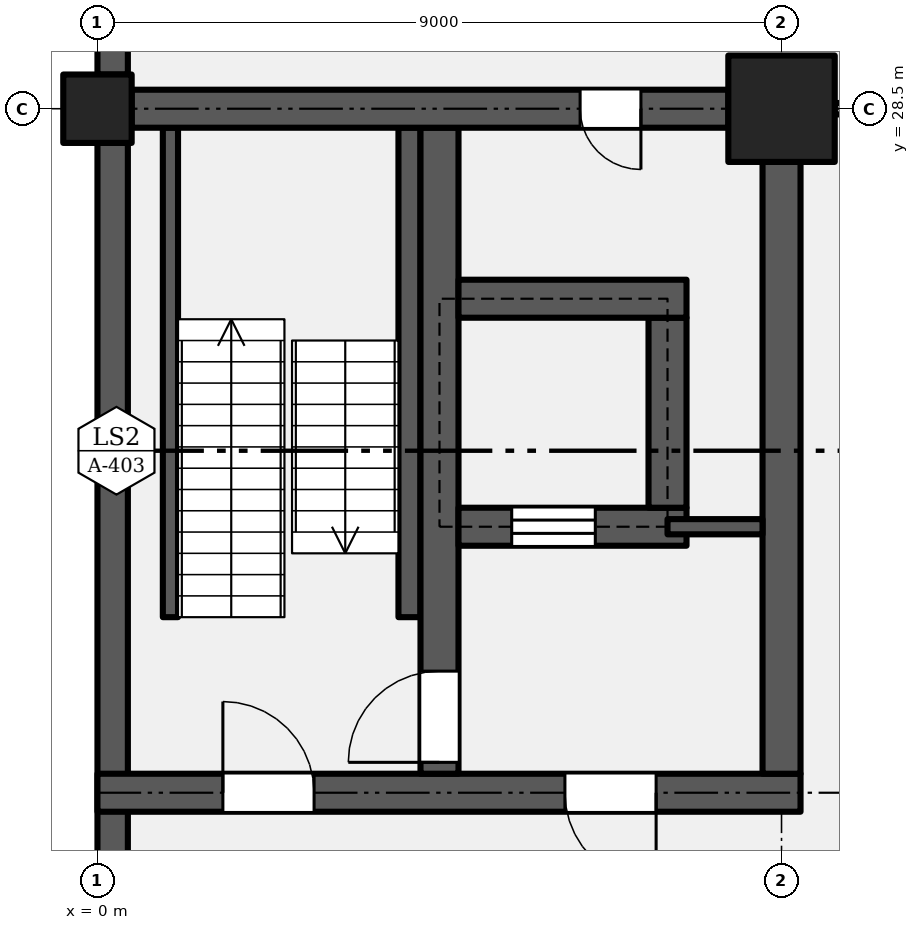
"""IFC4 building model, lengths in metres.
Left out: names, types, materials, properties, quantities, classifications, styles, units other than length and angle.
Written with IfcOpenShell. Run it as: python <this file> out.ifc"""

import sys

from ifc_helpers import new_model, si_unit, direction, frame, frame_2d, origin, origin_2d, place, context, subcontext, project, spatial, rectangle, extrude, element, fill, save


model = new_model("IFC4")
c1 = context("Model", 3, precision=1e-05, world=origin(), true_north=direction((0.0, 1.0)))
c2 = subcontext(c1, "Body", "Model", "MODEL_VIEW")
j1 = project(units=[si_unit("LENGTHUNIT", "METRE"), si_unit("PLANEANGLEUNIT", "RADIAN")], contexts=[c1])
p1 = place(None, origin())
s1 = spatial("IfcSite", under=j1, at=p1, CompositionType="ELEMENT")
p2 = place(p1, origin())
s2 = spatial("IfcBuilding", under=s1, at=p2, CompositionType="ELEMENT")
p3 = place(p2, frame((0.0, 0.0, -4.2)))
s3 = spatial("IfcBuildingStorey", under=s2, at=p3, CompositionType="ELEMENT", Elevation=-4.2)
p4 = place(p3, frame((0.0, 28.5, 0.0), z_axis=(0.0, 0.0, 1.0), x_axis=(1.0, 0.0, 0.0)))
e1 = element("IfcColumn", 1, at=p4, inside=s3, PredefinedType="COLUMN", context=c2, shape_type="SweptSolid", body=[
    extrude(rectangle(XDim=0.9, YDim=0.9, at=origin_2d()), origin(), (0.0, 0.0, 1.0), 4.2),
])
p5 = place(p3, frame((9.0, 28.5, 0.0), z_axis=(0.0, 0.0, 1.0), x_axis=(1.0, 0.0, 0.0)))
e2 = element("IfcColumn", 2, at=p5, inside=s3, PredefinedType="COLUMN", context=c2, shape_type="SweptSolid", body=[
    extrude(rectangle(XDim=1.4, YDim=1.4, at=origin_2d()), origin(), (0.0, 0.0, 1.0), 4.2),
])
p6 = place(p3, frame((0.2, 12.45, 0.0), z_axis=(0.0, 0.0, 1.0), x_axis=(0.0, 1.0, 0.0)))
e3 = element("IfcWall", 3, at=p6, inside=s3, PredefinedType="SOLIDWALL", context=c2, shape_type="SweptSolid", body=[
    extrude(rectangle(XDim=15.6, YDim=0.4, at=frame_2d((7.8, 0.0))), origin(), (0.0, 0.0, 1.0), 3.9),
])
p7 = place(p3, frame((0.0, 19.5, 0.0), z_axis=(0.0, 0.0, 1.0), x_axis=(1.0, 0.0, 0.0)))
e4 = element("IfcWall", 4, at=p7, inside=s3, PredefinedType="SHEAR", context=c2, shape_type="SweptSolid", body=[
    extrude(rectangle(XDim=9.25, YDim=0.5, at=frame_2d((4.625, 0.0))), origin(), (0.0, 0.0, 1.0), 3.9),
])
p8 = place(p7, frame((1.65, 0.0, 0.0)))
e5 = element("IfcOpeningElement", 5, at=p8, cuts=e4, PredefinedType="OPENING", context=c2, shape_type="SweptSolid", body=[
    extrude(rectangle(XDim=1.2, YDim=2.1, at=frame_2d((0.6, 1.05))), frame((0.0, 0.26, 0.0), z_axis=(0.0, -1.0, 0.0), x_axis=(1.0, 0.0, 0.0)), (0.0, 0.0, 1.0), 0.52),
])
p9 = place(p7, frame((7.35, 0.0, 0.0), z_axis=(0.0, 0.0, 1.0), x_axis=(-1.0, 0.0, 0.0)))
e6 = element("IfcOpeningElement", 6, at=p9, cuts=e4, PredefinedType="OPENING", context=c2, shape_type="SweptSolid", body=[
    extrude(rectangle(XDim=1.2, YDim=2.1, at=frame_2d((0.6, 1.05))), frame((0.0, 0.26, 0.0), z_axis=(0.0, -1.0, 0.0), x_axis=(1.0, 0.0, 0.0)), (0.0, 0.0, 1.0), 0.52),
])
p10 = place(p3, frame((4.5, 19.75, 0.0), z_axis=(0.0, 0.0, 1.0), x_axis=(0.0, 1.0, 0.0)))
e7 = element("IfcWall", 7, at=p10, inside=s3, PredefinedType="SHEAR", context=c2, shape_type="SweptSolid", body=[
    extrude(rectangle(XDim=8.5, YDim=0.5, at=frame_2d((4.25, 0.0))), origin(), (0.0, 0.0, 1.0), 3.9),
])
p11 = place(p10, frame((0.15, 0.0, 0.0)))
e8 = element("IfcOpeningElement", 8, at=p11, cuts=e7, PredefinedType="OPENING", context=c2, shape_type="SweptSolid", body=[
    extrude(rectangle(XDim=1.2, YDim=2.1, at=frame_2d((0.6, 1.05))), frame((0.0, 0.26, 0.0), z_axis=(0.0, -1.0, 0.0), x_axis=(1.0, 0.0, 0.0)), (0.0, 0.0, 1.0), 0.52),
])
p12 = place(p3, frame((9.0, 19.75, 0.0), z_axis=(0.0, 0.0, 1.0), x_axis=(0.0, 1.0, 0.0)))
e9 = element("IfcWall", 9, at=p12, inside=s3, PredefinedType="SHEAR", context=c2, shape_type="SweptSolid", body=[
    extrude(rectangle(XDim=8.05, YDim=0.5, at=frame_2d((4.025, 0.0))), origin(), (0.0, 0.0, 1.0), 3.9),
])
p13 = place(p3, frame((4.75, 23.0, 0.0), z_axis=(0.0, 0.0, 1.0), x_axis=(1.0, 0.0, 0.0)))
e10 = element("IfcWall", 10, at=p13, inside=s3, PredefinedType="SHEAR", context=c2, shape_type="SweptSolid", body=[
    extrude(rectangle(XDim=3.0, YDim=0.5, at=frame_2d((1.5, 0.0))), origin(), (0.0, 0.0, 1.0), 3.9),
])
p14 = place(p13, frame((0.7, 0.0, 0.0)))
e11 = element("IfcOpeningElement", 11, at=p14, cuts=e10, PredefinedType="OPENING", context=c2, shape_type="SweptSolid", body=[
    extrude(rectangle(XDim=1.1, YDim=2.1, at=frame_2d((0.55, 1.05))), frame((0.0, 0.26, 0.0), z_axis=(0.0, -1.0, 0.0), x_axis=(1.0, 0.0, 0.0)), (0.0, 0.0, 1.0), 0.52),
])
p15 = place(p3, frame((7.5, 23.25, 0.0), z_axis=(0.0, 0.0, 1.0), x_axis=(0.0, 1.0, 0.0)))
e12 = element("IfcWall", 12, at=p15, inside=s3, PredefinedType="SHEAR", context=c2, shape_type="SweptSolid", body=[
    extrude(rectangle(XDim=2.5, YDim=0.5, at=frame_2d((1.25, 0.0))), origin(), (0.0, 0.0, 1.0), 3.9),
])
p16 = place(p3, frame((4.75, 26.0, 0.0), z_axis=(0.0, 0.0, 1.0), x_axis=(1.0, 0.0, 0.0)))
e13 = element("IfcWall", 13, at=p16, inside=s3, PredefinedType="SHEAR", context=c2, shape_type="SweptSolid", body=[
    extrude(rectangle(XDim=3.0, YDim=0.5, at=frame_2d((1.5, 0.0))), origin(), (0.0, 0.0, 1.0), 3.9),
])
p17 = place(p3, frame((0.45, 28.5, 0.0), z_axis=(0.0, 0.0, 1.0), x_axis=(1.0, 0.0, 0.0)))
e14 = element("IfcWall", 14, at=p17, inside=s3, PredefinedType="SHEAR", context=c2, shape_type="SweptSolid", body=[
    extrude(rectangle(XDim=7.85, YDim=0.5, at=frame_2d((3.925, 0.0))), origin(), (0.0, 0.0, 1.0), 3.9),
])
p18 = place(p17, frame((6.7, 0.0, 0.0), z_axis=(0.0, 0.0, 1.0), x_axis=(-1.0, 0.0, 0.0)))
e15 = element("IfcOpeningElement", 15, at=p18, cuts=e14, PredefinedType="OPENING", context=c2, shape_type="SweptSolid", body=[
    extrude(rectangle(XDim=0.8, YDim=2.0, at=frame_2d((0.4, 1.0))), frame((0.0, 0.26, 0.0), z_axis=(0.0, -1.0, 0.0), x_axis=(1.0, 0.0, 0.0)), (0.0, 0.0, 1.0), 0.52),
])
p19 = place(p3, frame((0.2, 28.95, 0.0), z_axis=(0.0, 0.0, 1.0), x_axis=(0.0, 1.0, 0.0)))
e16 = element("IfcWall", 16, at=p19, inside=s3, PredefinedType="SOLIDWALL", context=c2, shape_type="SweptSolid", body=[
    extrude(rectangle(XDim=8.1, YDim=0.4, at=frame_2d((4.05, 0.0))), origin(), (0.0, 0.0, 1.0), 3.9),
])
p20 = place(p3, frame((7.5, 23.0, 0.0), z_axis=(0.0, 0.0, 1.0), x_axis=(1.0, 0.0, 0.0)))
e17 = element("IfcWall", 17, at=p20, inside=s3, PredefinedType="SHEAR", context=c2, shape_type="SweptSolid", body=[
    extrude(rectangle(XDim=1.25, YDim=0.2, at=frame_2d((0.625, 0.0))), origin(), (0.0, 0.0, 1.0), 3.9),
])
p21 = place(p3, frame((9.7, 28.5, 0.0), z_axis=(0.0, 0.0, 1.0), x_axis=(1.0, 0.0, 0.0)))
e18 = element("IfcWall", 18, at=p21, inside=s3, PredefinedType="PARTITIONING", context=c2, shape_type="SweptSolid", body=[
    extrude(rectangle(XDim=7.6, YDim=0.15, at=frame_2d((3.8, 0.0))), origin(), (0.0, 0.0, 1.0), 3.15),
])
p22 = place(p21, frame((0.2, 0.0, 0.0)))
e19 = element("IfcOpeningElement", 19, at=p22, cuts=e18, PredefinedType="OPENING", context=c2, shape_type="SweptSolid", body=[
    extrude(rectangle(XDim=1.4, YDim=2.1, at=frame_2d((0.7, 1.05))), frame((0.0, 0.085, 0.0), z_axis=(0.0, -1.0, 0.0), x_axis=(1.0, 0.0, 0.0)), (0.0, 0.0, 1.0), 0.17),
])
p23 = place(p3, frame((0.96, 21.81, 0.0), z_axis=(0.0, 0.0, 1.0), x_axis=(0.0, 1.0, 0.0)))
e20 = element("IfcWall", 20, at=p23, inside=s3, PredefinedType="SHEAR", context=c2, shape_type="SweptSolid", body=[
    extrude(rectangle(XDim=6.44, YDim=0.2, at=frame_2d((3.22, 0.0))), origin(), (0.0, 0.0, 1.0), 3.9),
])
p24 = place(p3, frame((4.105, 21.81, 0.0), z_axis=(0.0, 0.0, 1.0), x_axis=(0.0, 1.0, 0.0)))
e21 = element("IfcWall", 21, at=p24, inside=s3, PredefinedType="SHEAR", context=c2, shape_type="SweptSolid", body=[
    extrude(rectangle(XDim=6.44, YDim=0.29, at=frame_2d((3.22, 0.0))), origin(), (0.0, 0.0, 1.0), 3.9),
])
p25 = place(p8, origin())
e22 = element("IfcDoor", 22, at=p25, inside=s3, OperationType="SINGLE_SWING_LEFT", PredefinedType="DOOR", context=c2, shape_type="SweptSolid", body=[
    extrude(rectangle(XDim=1.2, YDim=2.1, at=frame_2d((0.6, 1.05))), frame((0.0, 0.025, 0.0), z_axis=(0.0, -1.0, 0.0), x_axis=(1.0, 0.0, 0.0)), (0.0, 0.0, 1.0), 0.05),
])
fill(e5, e22)
p26 = place(p18, origin())
e23 = element("IfcDoor", 23, at=p26, inside=s3, OperationType="SINGLE_SWING_LEFT", PredefinedType="DOOR", context=c2, shape_type="SweptSolid", body=[
    extrude(rectangle(XDim=0.8, YDim=2.0, at=frame_2d((0.4, 1.0))), frame((0.0, 0.025, 0.0), z_axis=(0.0, -1.0, 0.0), x_axis=(1.0, 0.0, 0.0)), (0.0, 0.0, 1.0), 0.05),
])
fill(e15, e23)
p27 = place(p9, origin())
e24 = element("IfcDoor", 24, at=p27, inside=s3, OperationType="SINGLE_SWING_LEFT", PredefinedType="DOOR", context=c2, shape_type="SweptSolid", body=[
    extrude(rectangle(XDim=1.2, YDim=2.1, at=frame_2d((0.6, 1.05))), frame((0.0, 0.025, 0.0), z_axis=(0.0, -1.0, 0.0), x_axis=(1.0, 0.0, 0.0)), (0.0, 0.0, 1.0), 0.05),
])
fill(e6, e24)
p28 = place(p11, origin())
e25 = element("IfcDoor", 25, at=p28, inside=s3, OperationType="SINGLE_SWING_LEFT", PredefinedType="DOOR", context=c2, shape_type="SweptSolid", body=[
    extrude(rectangle(XDim=1.2, YDim=2.1, at=frame_2d((0.6, 1.05))), frame((0.0, 0.025, 0.0), z_axis=(0.0, -1.0, 0.0), x_axis=(1.0, 0.0, 0.0)), (0.0, 0.0, 1.0), 0.05),
])
fill(e8, e25)
p29 = place(p14, origin())
e26 = element("IfcDoor", 26, at=p29, inside=s3, OperationType="SLIDING_TO_LEFT", PredefinedType="DOOR", context=c2, shape_type="SweptSolid", body=[
    extrude(rectangle(XDim=1.1, YDim=2.1, at=frame_2d((0.55, 1.05))), frame((0.0, 0.025, 0.0), z_axis=(0.0, -1.0, 0.0), x_axis=(1.0, 0.0, 0.0)), (0.0, 0.0, 1.0), 0.05),
])
fill(e11, e26)
save(model, sys.argv[1])
